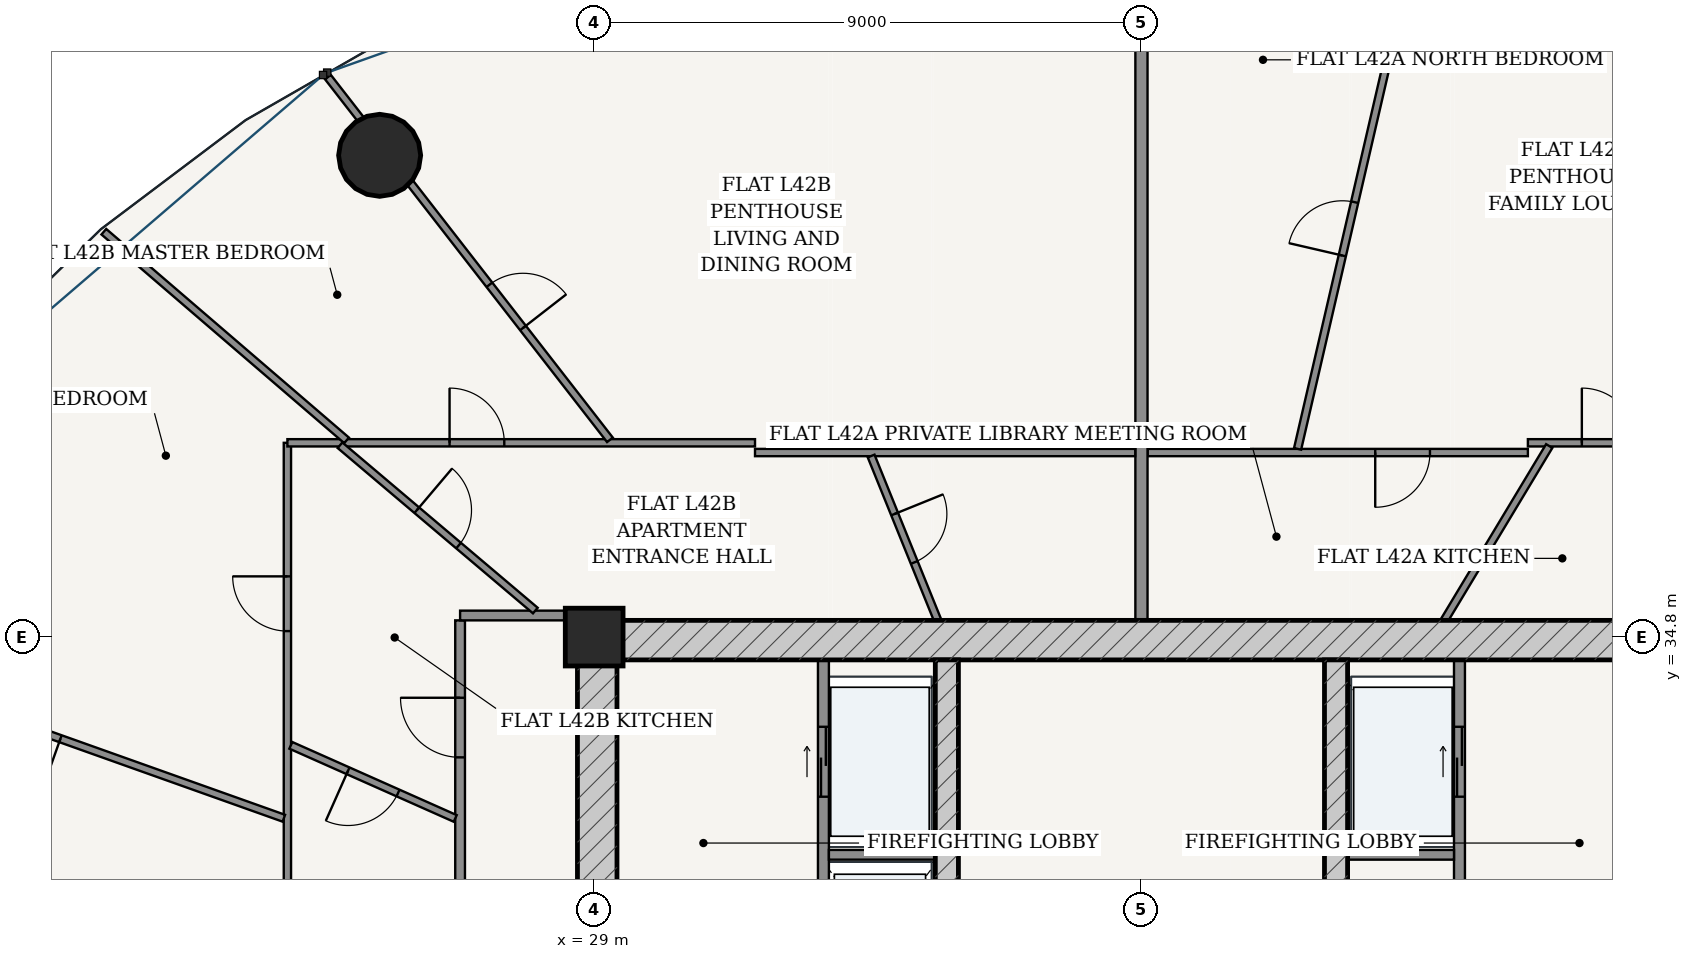
"""IFC4 building model, lengths in metres.
Left out: names, types, materials, properties, quantities, classifications, styles, units other than length and angle.
Written with IfcOpenShell. Run it as: python <this file> out.ifc"""

import sys

from ifc_helpers import new_model, si_unit, direction, frame, frame_2d, origin, origin_2d, place, context, subcontext, project, spatial, rectangle, hollow_circle, extrude, source, transform, mapped, element, fill, save


model = new_model("IFC4")
c1 = context("Model", 3, precision=1e-05, world=origin(), true_north=direction((-0.2419218956, 0.970295726276)))
c2 = subcontext(c1, "Body", "Model", "MODEL_VIEW")
j1 = project(units=[si_unit("LENGTHUNIT", "METRE"), si_unit("PLANEANGLEUNIT", "RADIAN")], contexts=[c1])
p1 = place(None, origin())
s1 = spatial("IfcSite", under=j1, at=p1, CompositionType="ELEMENT")
p2 = place(p1, origin())
s2 = spatial("IfcBuilding", under=s1, at=p2, CompositionType="ELEMENT")
p3 = place(p2, frame((0.0, 0.0, 160.6)))
s3 = spatial("IfcBuildingStorey", under=s2, at=p3, CompositionType="ELEMENT", Elevation=160.6)
p4 = place(p3, frame((29.0, 34.8, 0.0), z_axis=(0.0, 0.0, 1.0), x_axis=(1.0, 0.0, 0.0)))
e1 = element("IfcColumn", 1, at=p4, inside=s3, PredefinedType="COLUMN", context=c2, shape_type="SweptSolid", body=[
    extrude(rectangle(XDim=0.95, YDim=0.95, at=origin_2d()), origin(), (0.0, 0.0, 1.0), 3.6),
])
p5 = place(p3, frame((28.725, 34.75, 0.0), z_axis=(0.0, 0.0, 1.0), x_axis=(1.0, 0.0, 0.0)))
e2 = element("IfcWall", 2, at=p5, inside=s3, PredefinedType="SHEAR", context=c2, shape_type="SweptSolid", body=[
    extrude(rectangle(XDim=18.55, YDim=0.65, at=frame_2d((9.275, 0.0))), origin(), (0.0, 0.0, 1.0), 3.33),
])
p6 = place(p3, frame((29.05, 19.175, 0.0), z_axis=(0.0, 0.0, 1.0), x_axis=(0.0, 1.0, 0.0)))
e3 = element("IfcWall", 3, at=p6, inside=s3, PredefinedType="SHEAR", context=c2, shape_type="SweptSolid", body=[
    extrude(rectangle(XDim=15.25, YDim=0.65, at=frame_2d((7.625, 0.0))), origin(), (0.0, 0.0, 1.0), 3.33),
])
p7 = place(p6, frame((9.875, 0.0, 0.0)))
e4 = element("IfcOpeningElement", 4, at=p7, cuts=e3, PredefinedType="OPENING", context=c2, shape_type="SweptSolid", body=[
    extrude(rectangle(XDim=1.5, YDim=2.2, at=frame_2d((0.75, 1.1))), frame((0.0, 0.335, 0.0), z_axis=(0.0, -1.0, 0.0), x_axis=(1.0, 0.0, 0.0)), (0.0, 0.0, 1.0), 0.67),
])
p8 = place(p3, frame((34.8, 19.175, 0.0), z_axis=(0.0, 0.0, 1.0), x_axis=(0.0, 1.0, 0.0)))
e5 = element("IfcWall", 5, at=p8, inside=s3, PredefinedType="SHEAR", context=c2, shape_type="SweptSolid", body=[
    extrude(rectangle(XDim=15.25, YDim=0.38, at=frame_2d((7.625, 0.0))), origin(), (0.0, 0.0, 1.0), 3.33),
])
p9 = place(p8, frame((7.8, 0.0, 0.0)))
e6 = element("IfcOpeningElement", 6, at=p9, cuts=e5, PredefinedType="OPENING", context=c2, shape_type="SweptSolid", body=[
    extrude(rectangle(XDim=1.05, YDim=2.15, at=frame_2d((0.525, 1.075))), frame((0.0, 0.2, 0.0), z_axis=(0.0, -1.0, 0.0), x_axis=(1.0, 0.0, 0.0)), (0.0, 0.0, 1.0), 0.4),
])
p10 = place(p3, frame((41.2, 19.175, 0.0), z_axis=(0.0, 0.0, 1.0), x_axis=(0.0, 1.0, 0.0)))
e7 = element("IfcWall", 7, at=p10, inside=s3, PredefinedType="SHEAR", context=c2, shape_type="SweptSolid", body=[
    extrude(rectangle(XDim=15.25, YDim=0.38, at=frame_2d((7.625, 0.0))), origin(), (0.0, 0.0, 1.0), 3.33),
])
p11 = place(p10, frame((7.8, 0.0, 0.0)))
e8 = element("IfcOpeningElement", 8, at=p11, cuts=e7, PredefinedType="OPENING", context=c2, shape_type="SweptSolid", body=[
    extrude(rectangle(XDim=1.05, YDim=2.15, at=frame_2d((0.525, 1.075))), frame((0.0, 0.2, 0.0), z_axis=(0.0, -1.0, 0.0), x_axis=(1.0, 0.0, 0.0)), (0.0, 0.0, 1.0), 0.4),
])
p12 = place(p3, frame((25.472, 42.723, 0.0), z_axis=(0.0, 0.0, 1.0), x_axis=(1.0, 0.0, 0.0)))
e9 = element("IfcColumn", 9, at=p12, inside=s3, PredefinedType="COLUMN", context=c2, shape_type="SweptSolid", body=[
    extrude(hollow_circle(Radius=0.675, WallThickness=0.042, at=origin_2d()), origin(), (0.0, 0.0, 1.0), 3.6),
])
p13 = place(p3, frame((51.503, 44.043, 0.0), z_axis=(0.0, 0.0, 1.0), x_axis=(-0.942095406405, 0.335344964522, 0.0)))
e10 = element("IfcWall", 10, at=p13, inside=s3, PredefinedType="SOLIDWALL", context=c2, shape_type="SweptSolid", body=[
    extrude(rectangle(XDim=9.408, YDim=0.26, at=frame_2d((4.704, 0.0))), origin(), (0.0, 0.0, 1.0), 3.33),
])
p14 = place(p13, frame((4.029, 0.0, 0.0)))
e11 = element("IfcOpeningElement", 11, at=p14, cuts=e10, PredefinedType="OPENING", context=c2, shape_type="SweptSolid", body=[
    extrude(rectangle(XDim=1.35, YDim=2.2, at=frame_2d((0.675, 1.1))), frame((0.0, 0.14, 0.0), z_axis=(0.0, -1.0, 0.0), x_axis=(1.0, 0.0, 0.0)), (0.0, 0.0, 1.0), 0.28),
])
p15 = place(p3, frame((32.77, 28.52, 0.0), z_axis=(0.0, 0.0, 1.0), x_axis=(0.0, 1.0, 0.0)))
e12 = element("IfcWall", 12, at=p15, inside=s3, PredefinedType="PARTITIONING", context=c2, shape_type="SweptSolid", body=[
    extrude(rectangle(XDim=5.905, YDim=0.18, at=frame_2d((2.953, 0.0))), origin(), (0.0, 0.0, 1.0), 3.33),
])
p16 = place(p15, frame((3.655, 0.0, 0.0)))
e13 = element("IfcOpeningElement", 13, at=p16, cuts=e12, PredefinedType="OPENING", context=c2, shape_type="SweptSolid", body=[
    extrude(rectangle(XDim=1.15, YDim=2.2, at=frame_2d((0.575, 1.1))), frame((0.0, 0.1, 0.0), z_axis=(0.0, -1.0, 0.0), x_axis=(1.0, 0.0, 0.0)), (0.0, 0.0, 1.0), 0.2),
])
p17 = place(p15, frame((0.73, 0.0, 0.0)))
e14 = element("IfcOpeningElement", 14, at=p17, cuts=e12, PredefinedType="OPENING", context=c2, shape_type="SweptSolid", body=[
    extrude(rectangle(XDim=1.2, YDim=2.25, at=frame_2d((0.6, 1.125))), frame((0.0, 0.1, 0.0), z_axis=(0.0, -1.0, 0.0), x_axis=(1.0, 0.0, 0.0)), (0.0, 0.0, 1.0), 0.2),
])
p18 = place(p3, frame((32.86, 31.22, 0.0), z_axis=(0.0, 0.0, 1.0), x_axis=(1.0, 0.0, 0.0)))
e15 = element("IfcWall", 15, at=p18, inside=s3, PredefinedType="PARTITIONING", context=c2, shape_type="SweptSolid", body=[
    extrude(rectangle(XDim=1.75, YDim=0.16, at=frame_2d((0.875, 0.0))), origin(), (0.0, 0.0, 1.0), 3.33),
])
p19 = place(p3, frame((43.23, 28.52, 0.0), z_axis=(0.0, 0.0, 1.0), x_axis=(0.0, 1.0, 0.0)))
e16 = element("IfcWall", 16, at=p19, inside=s3, PredefinedType="PARTITIONING", context=c2, shape_type="SweptSolid", body=[
    extrude(rectangle(XDim=5.905, YDim=0.18, at=frame_2d((2.953, 0.0))), origin(), (0.0, 0.0, 1.0), 3.33),
])
p20 = place(p19, frame((0.905, 0.0, 0.0)))
e17 = element("IfcOpeningElement", 17, at=p20, cuts=e16, PredefinedType="OPENING", context=c2, shape_type="SweptSolid", body=[
    extrude(rectangle(XDim=0.85, YDim=2.1, at=frame_2d((0.425, 1.05))), frame((0.0, 0.1, 0.0), z_axis=(0.0, -1.0, 0.0), x_axis=(1.0, 0.0, 0.0)), (0.0, 0.0, 1.0), 0.2),
])
p21 = place(p19, frame((3.655, 0.0, 0.0)))
e18 = element("IfcOpeningElement", 18, at=p21, cuts=e16, PredefinedType="OPENING", context=c2, shape_type="SweptSolid", body=[
    extrude(rectangle(XDim=1.15, YDim=2.2, at=frame_2d((0.575, 1.1))), frame((0.0, 0.1, 0.0), z_axis=(0.0, -1.0, 0.0), x_axis=(1.0, 0.0, 0.0)), (0.0, 0.0, 1.0), 0.2),
])
p22 = place(p3, frame((41.39, 31.22, 0.0), z_axis=(0.0, 0.0, 1.0), x_axis=(1.0, 0.0, 0.0)))
e19 = element("IfcWall", 19, at=p22, inside=s3, PredefinedType="PARTITIONING", context=c2, shape_type="SweptSolid", body=[
    extrude(rectangle(XDim=1.75, YDim=0.16, at=frame_2d((0.875, 0.0))), origin(), (0.0, 0.0, 1.0), 3.33),
])
p23 = place(p3, frame((26.795, 24.4, 0.0), z_axis=(0.0, 0.0, 1.0), x_axis=(0.0, 1.0, 0.0)))
e20 = element("IfcWall", 20, at=p23, inside=s3, PredefinedType="PARTITIONING", context=c2, shape_type="SweptSolid", body=[
    extrude(rectangle(XDim=10.675, YDim=0.16, at=frame_2d((5.337, 0.0))), origin(), (0.0, 0.0, 1.0), 2.776),
])
p24 = place(p23, frame((8.422, 0.0, 0.0)))
e21 = element("IfcOpeningElement", 21, at=p24, cuts=e20, PredefinedType="OPENING", context=c2, shape_type="SweptSolid", body=[
    extrude(rectangle(XDim=0.98, YDim=2.2, at=frame_2d((0.49, 1.1))), frame((0.0, 0.09, 0.0), z_axis=(0.0, -1.0, 0.0), x_axis=(1.0, 0.0, 0.0)), (0.0, 0.0, 1.0), 0.18),
])
p25 = place(p3, frame((26.795, 35.155, 0.0), z_axis=(0.0, 0.0, 1.0), x_axis=(1.0, 0.0, 0.0)))
e22 = element("IfcWall", 22, at=p25, inside=s3, PredefinedType="PARTITIONING", context=c2, shape_type="SweptSolid", body=[
    extrude(rectangle(XDim=1.93, YDim=0.16, at=frame_2d((0.965, 0.0))), origin(), (0.0, 0.0, 1.0), 2.776),
])
p26 = place(p3, frame((38.102, 37.835, 0.0), z_axis=(0.0, 0.0, 1.0), x_axis=(1.0, 0.0, 0.0)))
e23 = element("IfcWall", 23, at=p26, inside=s3, PredefinedType="PARTITIONING", context=c2, shape_type="SweptSolid", body=[
    extrude(rectangle(XDim=6.253, YDim=0.12, at=frame_2d((3.126, 0.0))), origin(), (0.0, 0.0, 1.0), 2.776),
])
p27 = place(p26, frame((3.742, 0.0, 0.0)))
e24 = element("IfcOpeningElement", 24, at=p27, cuts=e23, PredefinedType="OPENING", context=c2, shape_type="SweptSolid", body=[
    extrude(rectangle(XDim=0.9, YDim=2.15, at=frame_2d((0.45, 1.075))), frame((0.0, 0.07, 0.0), z_axis=(0.0, -1.0, 0.0), x_axis=(1.0, 0.0, 0.0)), (0.0, 0.0, 1.0), 0.14),
])
p28 = place(p3, frame((44.355, 37.995, 0.0), z_axis=(0.0, 0.0, 1.0), x_axis=(1.0, 0.0, 0.0)))
e25 = element("IfcWall", 25, at=p28, inside=s3, PredefinedType="PARTITIONING", context=c2, shape_type="SweptSolid", body=[
    extrude(rectangle(XDim=7.69, YDim=0.12, at=frame_2d((3.845, 0.0))), origin(), (0.0, 0.0, 1.0), 2.776),
])
p29 = place(p28, frame((0.887, 0.0, 0.0)))
e26 = element("IfcOpeningElement", 26, at=p29, cuts=e25, PredefinedType="OPENING", context=c2, shape_type="SweptSolid", body=[
    extrude(rectangle(XDim=0.9, YDim=2.15, at=frame_2d((0.45, 1.075))), frame((0.0, 0.07, 0.0), z_axis=(0.0, -1.0, 0.0), x_axis=(1.0, 0.0, 0.0)), (0.0, 0.0, 1.0), 0.14),
])
p30 = place(p3, frame((40.568, 37.896, 0.0), z_axis=(0.0, 0.0, 1.0), x_axis=(0.225452174141, 0.974254236416, 0.0)))
e27 = element("IfcWall", 27, at=p30, inside=s3, PredefinedType="PARTITIONING", context=c2, shape_type="SweptSolid", body=[
    extrude(rectangle(XDim=9.446, YDim=0.12, at=frame_2d((4.723, 0.0))), origin(), (0.0, 0.0, 1.0), 2.776),
])
p31 = place(p30, frame((3.264, 0.0, 0.0)))
e28 = element("IfcOpeningElement", 28, at=p31, cuts=e27, PredefinedType="OPENING", context=c2, shape_type="SweptSolid", body=[
    extrude(rectangle(XDim=0.9, YDim=2.15, at=frame_2d((0.45, 1.075))), frame((0.0, 0.07, 0.0), z_axis=(0.0, -1.0, 0.0), x_axis=(1.0, 0.0, 0.0)), (0.0, 0.0, 1.0), 0.14),
])
p32 = place(p3, frame((42.98, 35.075, 0.0), z_axis=(0.0, 0.0, 1.0), x_axis=(0.515686235332, 0.856777512946, 0.0)))
e29 = element("IfcWall", 29, at=p32, inside=s3, PredefinedType="PARTITIONING", context=c2, shape_type="SweptSolid", body=[
    extrude(rectangle(XDim=3.346, YDim=0.12, at=frame_2d((1.673, 0.0))), origin(), (0.0, 0.0, 1.0), 3.33),
])
p33 = place(p3, frame((38.0, 35.075, 0.0), z_axis=(0.0, 0.0, 1.0), x_axis=(0.0, 1.0, 0.0)))
e30 = element("IfcWall", 30, at=p33, inside=s3, PredefinedType="PARTITIONING", context=c2, shape_type="SweptSolid", body=[
    extrude(rectangle(XDim=12.465, YDim=0.2, at=frame_2d((6.232, 0.0))), origin(), (0.0, 0.0, 1.0), 2.415),
])
p34 = place(p3, frame((23.955, 26.902, 0.0), z_axis=(0.0, 0.0, 1.0), x_axis=(0.0, 1.0, 0.0)))
e31 = element("IfcWall", 31, at=p34, inside=s3, PredefinedType="PARTITIONING", context=c2, shape_type="SweptSolid", body=[
    extrude(rectangle(XDim=11.093, YDim=0.12, at=frame_2d((5.546, 0.0))), origin(), (0.0, 0.0, 1.0), 2.776),
])
p35 = place(p34, frame((7.997, 0.0, 0.0)))
e32 = element("IfcOpeningElement", 32, at=p35, cuts=e31, PredefinedType="OPENING", context=c2, shape_type="SweptSolid", body=[
    extrude(rectangle(XDim=0.9, YDim=2.15, at=frame_2d((0.45, 1.075))), frame((0.0, 0.07, 0.0), z_axis=(0.0, -1.0, 0.0), x_axis=(1.0, 0.0, 0.0)), (0.0, 0.0, 1.0), 0.14),
])
p36 = place(p3, frame((23.955, 37.995, 0.0), z_axis=(0.0, 0.0, 1.0), x_axis=(1.0, 0.0, 0.0)))
e33 = element("IfcWall", 33, at=p36, inside=s3, PredefinedType="PARTITIONING", context=c2, shape_type="SweptSolid", body=[
    extrude(rectangle(XDim=7.69, YDim=0.12, at=frame_2d((3.845, 0.0))), origin(), (0.0, 0.0, 1.0), 2.776),
])
p37 = place(p36, frame((2.667, 0.0, 0.0)))
e34 = element("IfcOpeningElement", 34, at=p37, cuts=e33, PredefinedType="OPENING", context=c2, shape_type="SweptSolid", body=[
    extrude(rectangle(XDim=0.9, YDim=2.15, at=frame_2d((0.45, 1.075))), frame((0.0, 0.07, 0.0), z_axis=(0.0, -1.0, 0.0), x_axis=(1.0, 0.0, 0.0)), (0.0, 0.0, 1.0), 0.14),
])
p38 = place(p3, frame((31.645, 37.835, 0.0), z_axis=(0.0, 0.0, 1.0), x_axis=(1.0, 0.0, 0.0)))
e35 = element("IfcWall", 35, at=p38, inside=s3, PredefinedType="PARTITIONING", context=c2, shape_type="SweptSolid", body=[
    extrude(rectangle(XDim=6.253, YDim=0.12, at=frame_2d((3.126, 0.0))), origin(), (0.0, 0.0, 1.0), 2.776),
])
p39 = place(p3, frame((29.259, 38.044, 0.0), z_axis=(0.0, 0.0, 1.0), x_axis=(-0.613770587295, 0.789484430607, 0.0)))
e36 = element("IfcWall", 36, at=p39, inside=s3, PredefinedType="PARTITIONING", context=c2, shape_type="SweptSolid", body=[
    extrude(rectangle(XDim=7.556, YDim=0.12, at=frame_2d((3.778, 0.0))), origin(), (0.0, 0.0, 1.0), 2.776),
])
p40 = place(p39, frame((2.33, 0.0, 0.0)))
e37 = element("IfcOpeningElement", 37, at=p40, cuts=e36, PredefinedType="OPENING", context=c2, shape_type="SweptSolid", body=[
    extrude(rectangle(XDim=0.9, YDim=2.15, at=frame_2d((0.45, 1.075))), frame((0.0, 0.07, 0.0), z_axis=(0.0, -1.0, 0.0), x_axis=(1.0, 0.0, 0.0)), (0.0, 0.0, 1.0), 0.14),
])
p41 = place(p3, frame((24.928, 38.035, 0.0), z_axis=(0.0, 0.0, 1.0), x_axis=(-0.758368609512, 0.65182593697, 0.0)))
e38 = element("IfcWall", 38, at=p41, inside=s3, PredefinedType="PARTITIONING", context=c2, shape_type="SweptSolid", body=[
    extrude(rectangle(XDim=5.263, YDim=0.12, at=frame_2d((2.632, 0.0))), origin(), (0.0, 0.0, 1.0), 2.846),
])
p42 = place(p3, frame((23.896, 31.821, 0.0), z_axis=(0.0, 0.0, 1.0), x_axis=(-0.942072876428, 0.335408251983, 0.0)))
e39 = element("IfcWall", 39, at=p42, inside=s3, PredefinedType="PARTITIONING", context=c2, shape_type="SweptSolid", body=[
    extrude(rectangle(XDim=8.7, YDim=0.12, at=frame_2d((4.35, 0.0))), origin(), (0.0, 0.0, 1.0), 2.846),
])
p43 = place(p42, frame((3.9, 0.0, 0.0)))
e40 = element("IfcOpeningElement", 40, at=p43, cuts=e39, PredefinedType="OPENING", context=c2, shape_type="SweptSolid", body=[
    extrude(rectangle(XDim=0.9, YDim=2.15, at=frame_2d((0.45, 1.075))), frame((0.0, 0.07, 0.0), z_axis=(0.0, -1.0, 0.0), x_axis=(1.0, 0.0, 0.0)), (0.0, 0.0, 1.0), 0.14),
])
p44 = place(p3, frame((34.649, 35.075, 0.0), z_axis=(0.0, 0.0, 1.0), x_axis=(-0.37535719187, 0.926880239573, 0.0)))
e41 = element("IfcWall", 41, at=p44, inside=s3, PredefinedType="PARTITIONING", context=c2, shape_type="SweptSolid", body=[
    extrude(rectangle(XDim=2.916, YDim=0.12, at=frame_2d((1.458, 0.0))), origin(), (0.0, 0.0, 1.0), 3.33),
])
p45 = place(p44, frame((1.028, 0.0, 0.0)))
e42 = element("IfcOpeningElement", 42, at=p45, cuts=e41, PredefinedType="OPENING", context=c2, shape_type="SweptSolid", body=[
    extrude(rectangle(XDim=0.86, YDim=2.15, at=frame_2d((0.43, 1.075))), frame((0.0, 0.07, 0.0), z_axis=(0.0, -1.0, 0.0), x_axis=(1.0, 0.0, 0.0)), (0.0, 0.0, 1.0), 0.14),
])
p46 = place(p3, frame((28.032, 35.236, 0.0), z_axis=(0.0, 0.0, 1.0), x_axis=(-0.763324664245, 0.646015059388, 0.0)))
e43 = element("IfcWall", 43, at=p46, inside=s3, PredefinedType="PARTITIONING", context=c2, shape_type="SweptSolid", body=[
    extrude(rectangle(XDim=4.208, YDim=0.12, at=frame_2d((2.104, 0.0))), origin(), (0.0, 0.0, 1.0), 3.005),
])
p47 = place(p46, frame((1.654, 0.0, 0.0)))
e44 = element("IfcOpeningElement", 44, at=p47, cuts=e43, PredefinedType="OPENING", context=c2, shape_type="SweptSolid", body=[
    extrude(rectangle(XDim=0.9, YDim=2.15, at=frame_2d((0.45, 1.075))), frame((0.0, 0.07, 0.0), z_axis=(0.0, -1.0, 0.0), x_axis=(1.0, 0.0, 0.0)), (0.0, 0.0, 1.0), 0.14),
])
p48 = place(p3, frame((26.715, 31.818, 0.0), z_axis=(0.0, 0.0, 1.0), x_axis=(-0.91376049718, 0.406253312347, 0.0)))
e45 = element("IfcWall", 45, at=p48, inside=s3, PredefinedType="PARTITIONING", context=c2, shape_type="SweptSolid", body=[
    extrude(rectangle(XDim=2.958, YDim=0.12, at=frame_2d((1.479, 0.0))), origin(), (0.0, 0.0, 1.0), 3.33),
])
p49 = place(p48, frame((1.029, 0.0, 0.0)))
e46 = element("IfcOpeningElement", 46, at=p49, cuts=e45, PredefinedType="OPENING", context=c2, shape_type="SweptSolid", body=[
    extrude(rectangle(XDim=0.9, YDim=2.15, at=frame_2d((0.45, 1.075))), frame((0.0, 0.07, 0.0), z_axis=(0.0, -1.0, 0.0), x_axis=(1.0, 0.0, 0.0)), (0.0, 0.0, 1.0), 0.14),
])
m1 = source(origin(), c2, "Body", "SweptSolid", [
    extrude(rectangle(XDim=1.15, YDim=2.2, at=frame_2d((0.575, 1.1))), frame((0.0, 0.025, 0.0), z_axis=(0.0, -1.0, 0.0), x_axis=(1.0, 0.0, 0.0)), (0.0, 0.0, 1.0), 0.05),
])
p50 = place(p16, origin())
e47 = element("IfcDoor", 47, at=p50, inside=s3, OperationType="DOUBLE_DOOR_SLIDING", PredefinedType="DOOR", context=c2, shape_type="MappedRepresentation", body=[
    mapped(m1, transform((0.0, 0.0, 0.0), scale=1.0)),
])
fill(e13, e47)
p51 = place(p21, origin())
e48 = element("IfcDoor", 48, at=p51, inside=s3, OperationType="DOUBLE_DOOR_SLIDING", PredefinedType="DOOR", context=c2, shape_type="MappedRepresentation", body=[
    mapped(m1, transform((0.0, 0.0, 0.0), scale=1.0)),
])
fill(e18, e48)
m2 = source(origin(), c2, "Body", "SweptSolid", [
    extrude(rectangle(XDim=0.9, YDim=2.15, at=frame_2d((0.45, 1.075))), frame((0.0, 0.025, 0.0), z_axis=(0.0, -1.0, 0.0), x_axis=(1.0, 0.0, 0.0)), (0.0, 0.0, 1.0), 0.05),
])
p52 = place(p29, origin())
e49 = element("IfcDoor", 49, at=p52, inside=s3, OperationType="SINGLE_SWING_LEFT", PredefinedType="DOOR", context=c2, shape_type="MappedRepresentation", body=[
    mapped(m2, transform((0.0, 0.0, 0.0), scale=1.0)),
])
fill(e26, e49)
p53 = place(p27, frame((0.9, 0.0, 0.0), z_axis=(0.0, 0.0, 1.0), x_axis=(-1.0, 0.0, 0.0)))
e50 = element("IfcDoor", 50, at=p53, inside=s3, OperationType="SINGLE_SWING_RIGHT", PredefinedType="DOOR", context=c2, shape_type="MappedRepresentation", body=[
    mapped(m2, transform((0.0, 0.0, 0.0), scale=1.0)),
])
fill(e24, e50)
p54 = place(p31, origin())
e51 = element("IfcDoor", 51, at=p54, inside=s3, OperationType="SINGLE_SWING_LEFT", PredefinedType="DOOR", context=c2, shape_type="MappedRepresentation", body=[
    mapped(m2, transform((0.0, 0.0, 0.0), scale=1.0)),
])
fill(e28, e51)
m3 = source(origin(), c2, "Body", "SweptSolid", [
    extrude(rectangle(XDim=0.98, YDim=2.2, at=frame_2d((0.49, 1.1))), frame((0.0, 0.025, 0.0), z_axis=(0.0, -1.0, 0.0), x_axis=(1.0, 0.0, 0.0)), (0.0, 0.0, 1.0), 0.05),
])
p55 = place(p24, origin())
e52 = element("IfcDoor", 52, at=p55, inside=s3, OperationType="SINGLE_SWING_RIGHT", PredefinedType="DOOR", context=c2, shape_type="MappedRepresentation", body=[
    mapped(m3, transform((0.0, 0.0, 0.0), scale=1.0)),
])
fill(e21, e52)
p56 = place(p47, frame((0.9, 0.0, 0.0), z_axis=(0.0, 0.0, 1.0), x_axis=(-1.0, 0.0, 0.0)))
e53 = element("IfcDoor", 53, at=p56, inside=s3, OperationType="SINGLE_SWING_LEFT", PredefinedType="DOOR", context=c2, shape_type="MappedRepresentation", body=[
    mapped(m2, transform((0.0, 0.0, 0.0), scale=1.0)),
])
fill(e44, e53)
p57 = place(p49, origin())
e54 = element("IfcDoor", 54, at=p57, inside=s3, OperationType="SINGLE_SWING_RIGHT", PredefinedType="DOOR", context=c2, shape_type="MappedRepresentation", body=[
    mapped(m2, transform((0.0, 0.0, 0.0), scale=1.0)),
])
fill(e46, e54)
p58 = place(p37, origin())
e55 = element("IfcDoor", 55, at=p58, inside=s3, OperationType="SINGLE_SWING_LEFT", PredefinedType="DOOR", context=c2, shape_type="MappedRepresentation", body=[
    mapped(m2, transform((0.0, 0.0, 0.0), scale=1.0)),
])
fill(e34, e55)
p59 = place(p35, origin())
e56 = element("IfcDoor", 56, at=p59, inside=s3, OperationType="SINGLE_SWING_RIGHT", PredefinedType="DOOR", context=c2, shape_type="MappedRepresentation", body=[
    mapped(m2, transform((0.0, 0.0, 0.0), scale=1.0)),
])
fill(e32, e56)
m4 = source(origin(), c2, "Body", "SweptSolid", [
    extrude(rectangle(XDim=0.86, YDim=2.15, at=frame_2d((0.43, 1.075))), frame((0.0, 0.025, 0.0), z_axis=(0.0, -1.0, 0.0), x_axis=(1.0, 0.0, 0.0)), (0.0, 0.0, 1.0), 0.05),
])
p60 = place(p45, frame((0.86, 0.0, 0.0), z_axis=(0.0, 0.0, 1.0), x_axis=(-1.0, 0.0, 0.0)))
e57 = element("IfcDoor", 57, at=p60, inside=s3, OperationType="SINGLE_SWING_LEFT", PredefinedType="DOOR", context=c2, shape_type="MappedRepresentation", body=[
    mapped(m4, transform((0.0, 0.0, 0.0), scale=1.0)),
])
fill(e42, e57)
p61 = place(p40, frame((0.9, 0.0, 0.0), z_axis=(0.0, 0.0, 1.0), x_axis=(-1.0, 0.0, 0.0)))
e58 = element("IfcDoor", 58, at=p61, inside=s3, OperationType="SINGLE_SWING_RIGHT", PredefinedType="DOOR", context=c2, shape_type="MappedRepresentation", body=[
    mapped(m2, transform((0.0, 0.0, 0.0), scale=1.0)),
])
fill(e37, e58)
p62 = place(p43, origin())
e59 = element("IfcDoor", 59, at=p62, inside=s3, OperationType="SINGLE_SWING_LEFT", PredefinedType="DOOR", context=c2, shape_type="MappedRepresentation", body=[
    mapped(m2, transform((0.0, 0.0, 0.0), scale=1.0)),
])
fill(e40, e59)
save(model, sys.argv[1])
